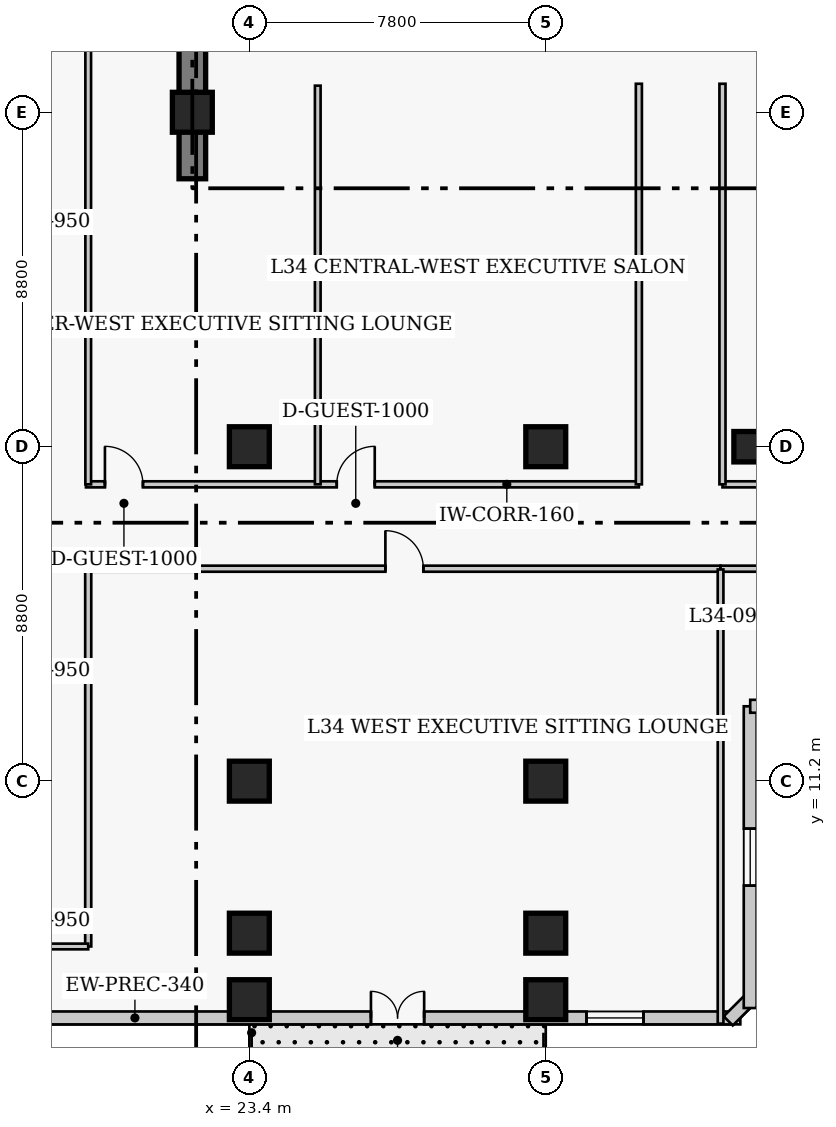
"""IFC4 building model, lengths in metres.
Left out: names, types, materials, properties, quantities, classifications, styles, units other than length and angle.
Written with IfcOpenShell. Run it as: python <this file> out.ifc"""

import sys

from ifc_helpers import new_model, si_unit, direction, frame, frame_2d, origin, origin_2d, place, context, subcontext, project, spatial, rectangle, extrude, element, fill, save


model = new_model("IFC4")
c1 = context("Model", 3, precision=1e-05, world=origin(), true_north=direction((0.0, 1.0)))
c2 = subcontext(c1, "Body", "Model", "MODEL_VIEW")
j1 = project(units=[si_unit("LENGTHUNIT", "METRE"), si_unit("PLANEANGLEUNIT", "RADIAN")], contexts=[c1])
p1 = place(None, origin())
s1 = spatial("IfcSite", under=j1, at=p1, CompositionType="ELEMENT")
p2 = place(p1, origin())
s2 = spatial("IfcBuilding", under=s1, at=p2, CompositionType="ELEMENT")
p3 = place(p2, frame((0.0, 0.0, 138.4)))
s3 = spatial("IfcBuildingStorey", under=s2, at=p3, CompositionType="ELEMENT", Elevation=138.4)
p4 = place(p3, frame((21.9, 27.05, 0.0), z_axis=(0.0, 0.0, 1.0), x_axis=(0.0, 1.0, 0.0)))
e1 = element("IfcWall", 1, at=p4, inside=s3, PredefinedType="SHEAR", context=c2, shape_type="SweptSolid", body=[
    extrude(rectangle(XDim=13.62, YDim=0.7, at=frame_2d((6.81, 0.0))), origin(), (0.0, 0.0, 1.0), 3.8),
])
for number, where, z_axis, x_axis in (
    (2, (23.4, 11.2, 0.0), (0.0, 0.0, 1.0), (1.0, 0.0, 0.0)),
    (3, (23.4, 20.0, 0.0), (0.0, 0.0, 1.0), (1.0, 0.0, 0.0)),
    (4, (31.2, 11.2, 0.0), (0.0, 0.0, 1.0), (1.0, 0.0, 0.0)),
    (5, (31.2, 20.0, 0.0), (0.0, 0.0, 1.0), (1.0, 0.0, 0.0)),
):
    element("IfcColumn", number, at=place(p3, frame(where, z_axis=z_axis, x_axis=x_axis)), inside=s3, PredefinedType="COLUMN", context=c2, shape_type="SweptSolid", body=[
        extrude(rectangle(XDim=1.05, YDim=1.05, at=origin_2d()), origin(), (0.0, 0.0, 1.0), 3.8),
    ])
p5 = place(p3, frame((36.75, 20.0, 0.0), z_axis=(0.0, 0.0, 1.0), x_axis=(1.0, 0.0, 0.0)))
e6 = element("IfcColumn", 6, at=p5, inside=s3, PredefinedType="COLUMN", context=c2, shape_type="SweptSolid", body=[
    extrude(rectangle(XDim=1.2, YDim=0.8, at=origin_2d()), origin(), (0.0, 0.0, 1.0), 3.8),
])
for number, where, z_axis, x_axis in (
    (7, (21.9, 28.8, 0.0), (0.0, 0.0, 1.0), (1.0, 0.0, 0.0)),
    (8, (23.4, 7.2, 0.0), (0.0, 0.0, 1.0), (1.0, 0.0, 0.0)),
    (9, (31.2, 7.2, 0.0), (0.0, 0.0, 1.0), (1.0, 0.0, 0.0)),
    (10, (23.4, 5.45, 0.0), (0.0, 0.0, 1.0), (1.0, 0.0, 0.0)),
    (11, (31.2, 5.45, 0.0), (0.0, 0.0, 1.0), (1.0, 0.0, 0.0)),
):
    element("IfcColumn", number, at=place(p3, frame(where, z_axis=z_axis, x_axis=x_axis)), inside=s3, PredefinedType="COLUMN", context=c2, shape_type="SweptSolid", body=[
        extrude(rectangle(XDim=1.05, YDim=1.05, at=origin_2d()), origin(), (0.0, 0.0, 1.0), 3.8),
    ])
p6 = place(p3, frame((9.63, 4.97, 0.0), z_axis=(0.0, 0.0, 1.0), x_axis=(1.0, 0.0, 0.0)))
e12 = element("IfcWall", 12, at=p6, inside=s3, PredefinedType="SOLIDWALL", context=c2, shape_type="SweptSolid", body=[
    extrude(rectangle(XDim=26.69, YDim=0.34, at=frame_2d((13.345, 0.0))), origin(), (0.0, 0.0, 1.0), 3.55),
])
p7 = place(p6, frame((16.97, 0.0, 0.0)))
e13 = element("IfcOpeningElement", 13, at=p7, cuts=e12, PredefinedType="OPENING", context=c2, shape_type="SweptSolid", body=[
    extrude(rectangle(XDim=1.4, YDim=2.15, at=frame_2d((0.7, 1.075))), frame((0.0, 0.18, 0.0), z_axis=(0.0, -1.0, 0.0), x_axis=(1.0, 0.0, 0.0)), (0.0, 0.0, 1.0), 0.36),
])
p8 = place(p6, frame((3.048, 0.0, 0.85)))
e14 = element("IfcOpeningElement", 14, at=p8, cuts=e12, PredefinedType="OPENING", context=c2, shape_type="SweptSolid", body=[
    extrude(rectangle(XDim=1.5, YDim=1.75, at=frame_2d((0.75, 0.875))), frame((0.0, 0.18, 0.0), z_axis=(0.0, -1.0, 0.0), x_axis=(1.0, 0.0, 0.0)), (0.0, 0.0, 1.0), 0.36),
])
p9 = place(p6, frame((22.642, 0.0, 0.85)))
e15 = element("IfcOpeningElement", 15, at=p9, cuts=e12, PredefinedType="OPENING", context=c2, shape_type="SweptSolid", body=[
    extrude(rectangle(XDim=1.5, YDim=1.75, at=frame_2d((0.75, 0.875))), frame((0.0, 0.18, 0.0), z_axis=(0.0, -1.0, 0.0), x_axis=(1.0, 0.0, 0.0)), (0.0, 0.0, 1.0), 0.36),
])
p10 = place(p3, frame((36.001, 4.892, 0.0), z_axis=(0.0, 0.0, 1.0), x_axis=(0.707106781187, 0.707106781187, 0.0)))
e16 = element("IfcWall", 16, at=p10, inside=s3, PredefinedType="SOLIDWALL", context=c2, shape_type="SweptSolid", body=[
    extrude(rectangle(XDim=0.929, YDim=0.34, at=frame_2d((0.464, 0.0))), origin(), (0.0, 0.0, 1.0), 3.55),
])
p11 = place(p3, frame((36.58, 5.23, 0.0), z_axis=(0.0, 0.0, 1.0), x_axis=(0.0, 1.0, 0.0)))
e17 = element("IfcWall", 17, at=p11, inside=s3, PredefinedType="SOLIDWALL", context=c2, shape_type="SweptSolid", body=[
    extrude(rectangle(XDim=7.94, YDim=0.34, at=frame_2d((3.97, 0.0))), origin(), (0.0, 0.0, 1.0), 3.55),
])
p12 = place(p11, frame((3.22, 0.0, 0.85)))
e18 = element("IfcOpeningElement", 18, at=p12, cuts=e17, PredefinedType="OPENING", context=c2, shape_type="SweptSolid", body=[
    extrude(rectangle(XDim=1.5, YDim=1.75, at=frame_2d((0.75, 0.875))), frame((0.0, 0.18, 0.0), z_axis=(0.0, -1.0, 0.0), x_axis=(1.0, 0.0, 0.0)), (0.0, 0.0, 1.0), 0.36),
])
p13 = place(p3, frame((36.58, 13.17, 0.0), z_axis=(0.0, 0.0, 1.0), x_axis=(1.0, 0.0, 0.0)))
e19 = element("IfcWall", 19, at=p13, inside=s3, PredefinedType="SOLIDWALL", context=c2, shape_type="SweptSolid", body=[
    extrude(rectangle(XDim=4.84, YDim=0.34, at=frame_2d((2.42, 0.0))), origin(), (0.0, 0.0, 1.0), 3.55),
])
p14 = place(p13, frame((1.67, 0.0, 0.85)))
e20 = element("IfcOpeningElement", 20, at=p14, cuts=e19, PredefinedType="OPENING", context=c2, shape_type="SweptSolid", body=[
    extrude(rectangle(XDim=1.5, YDim=1.75, at=frame_2d((0.75, 0.875))), frame((0.0, 0.18, 0.0), z_axis=(0.0, -1.0, 0.0), x_axis=(1.0, 0.0, 0.0)), (0.0, 0.0, 1.0), 0.36),
])
p15 = place(p3, frame((19.1, 19.01, 0.0), z_axis=(0.0, 0.0, 1.0), x_axis=(1.0, 0.0, 0.0)))
e21 = element("IfcWall", 21, at=p15, inside=s3, PredefinedType="PARTITIONING", context=c2, shape_type="SweptSolid", body=[
    extrude(rectangle(XDim=14.55, YDim=0.16, at=frame_2d((7.275, 0.0))), origin(), (0.0, 0.0, 1.0), 3.55),
])
p16 = place(p15, frame((0.5, 0.0, 0.0)))
e22 = element("IfcOpeningElement", 22, at=p16, cuts=e21, PredefinedType="OPENING", context=c2, shape_type="SweptSolid", body=[
    extrude(rectangle(XDim=1.0, YDim=2.15, at=frame_2d((0.5, 1.075))), frame((0.0, 0.09, 0.0), z_axis=(0.0, -1.0, 0.0), x_axis=(1.0, 0.0, 0.0)), (0.0, 0.0, 1.0), 0.18),
])
p17 = place(p15, frame((6.6, 0.0, 0.0)))
e23 = element("IfcOpeningElement", 23, at=p17, cuts=e21, PredefinedType="OPENING", context=c2, shape_type="SweptSolid", body=[
    extrude(rectangle(XDim=1.0, YDim=2.15, at=frame_2d((0.5, 1.075))), frame((0.0, 0.09, 0.0), z_axis=(0.0, -1.0, 0.0), x_axis=(1.0, 0.0, 0.0)), (0.0, 0.0, 1.0), 0.18),
])
p18 = place(p3, frame((35.85, 19.01, 0.0), z_axis=(0.0, 0.0, 1.0), x_axis=(1.0, 0.0, 0.0)))
e24 = element("IfcWall", 24, at=p18, inside=s3, PredefinedType="PARTITIONING", context=c2, shape_type="SweptSolid", body=[
    extrude(rectangle(XDim=23.15, YDim=0.16, at=frame_2d((11.575, 0.0))), origin(), (0.0, 0.0, 1.0), 3.55),
])
p19 = place(p18, frame((7.25, 0.0, 0.0)))
e25 = element("IfcOpeningElement", 25, at=p19, cuts=e24, PredefinedType="OPENING", context=c2, shape_type="SweptSolid", body=[
    extrude(rectangle(XDim=1.0, YDim=2.15, at=frame_2d((0.5, 1.075))), frame((0.0, 0.09, 0.0), z_axis=(0.0, -1.0, 0.0), x_axis=(1.0, 0.0, 0.0)), (0.0, 0.0, 1.0), 0.18),
])
p20 = place(p18, frame((14.85, 0.0, 0.0)))
e26 = element("IfcOpeningElement", 26, at=p20, cuts=e24, PredefinedType="OPENING", context=c2, shape_type="SweptSolid", body=[
    extrude(rectangle(XDim=1.0, YDim=2.15, at=frame_2d((0.5, 1.075))), frame((0.0, 0.09, 0.0), z_axis=(0.0, -1.0, 0.0), x_axis=(1.0, 0.0, 0.0)), (0.0, 0.0, 1.0), 0.18),
])
for number, where, z_axis, x_axis in (
    (27, (33.65, 19.01, 0.0), (0.0, 0.0, 1.0), (0.0, 1.0, 0.0)),
    (28, (35.85, 19.01, 0.0), (0.0, 0.0, 1.0), (0.0, 1.0, 0.0)),
):
    element("IfcWall", number, at=place(p3, frame(where, z_axis=z_axis, x_axis=x_axis)), inside=s3, PredefinedType="PARTITIONING", context=c2, shape_type="SweptSolid", body=[
        extrude(rectangle(XDim=10.54, YDim=0.16, at=frame_2d((5.27, 0.0))), origin(), (0.0, 0.0, 1.0), 3.55),
    ])
p21 = place(p3, frame((19.1, 16.79, 0.0), z_axis=(0.0, 0.0, 1.0), x_axis=(1.0, 0.0, 0.0)))
e29 = element("IfcWall", 29, at=p21, inside=s3, PredefinedType="PARTITIONING", context=c2, shape_type="SweptSolid", body=[
    extrude(rectangle(XDim=16.7, YDim=0.16, at=frame_2d((8.35, 0.0))), origin(), (0.0, 0.0, 1.0), 3.55),
])
p22 = place(p21, frame((7.88, 0.0, 0.0)))
e30 = element("IfcOpeningElement", 30, at=p22, cuts=e29, PredefinedType="OPENING", context=c2, shape_type="SweptSolid", body=[
    extrude(rectangle(XDim=1.0, YDim=2.15, at=frame_2d((0.5, 1.075))), frame((0.0, 0.09, 0.0), z_axis=(0.0, -1.0, 0.0), x_axis=(1.0, 0.0, 0.0)), (0.0, 0.0, 1.0), 0.18),
])
p23 = place(p3, frame((35.8, 16.79, 0.0), z_axis=(0.0, 0.0, 1.0), x_axis=(1.0, 0.0, 0.0)))
e31 = element("IfcWall", 31, at=p23, inside=s3, PredefinedType="PARTITIONING", context=c2, shape_type="SweptSolid", body=[
    extrude(rectangle(XDim=23.2, YDim=0.16, at=frame_2d((11.6, 0.0))), origin(), (0.0, 0.0, 1.0), 3.55),
])
p24 = place(p23, frame((6.202, 0.0, 0.0)))
e32 = element("IfcOpeningElement", 32, at=p24, cuts=e31, PredefinedType="OPENING", context=c2, shape_type="SweptSolid", body=[
    extrude(rectangle(XDim=0.95, YDim=2.1, at=frame_2d((0.475, 1.05))), frame((0.0, 0.09, 0.0), z_axis=(0.0, -1.0, 0.0), x_axis=(1.0, 0.0, 0.0)), (0.0, 0.0, 1.0), 0.18),
])
p25 = place(p23, frame((13.413, 0.0, 0.0)))
e33 = element("IfcOpeningElement", 33, at=p25, cuts=e31, PredefinedType="OPENING", context=c2, shape_type="SweptSolid", body=[
    extrude(rectangle(XDim=1.0, YDim=2.15, at=frame_2d((0.5, 1.075))), frame((0.0, 0.09, 0.0), z_axis=(0.0, -1.0, 0.0), x_axis=(1.0, 0.0, 0.0)), (0.0, 0.0, 1.0), 0.18),
])
p26 = place(p23, frame((18.343, 0.0, 0.0)))
e34 = element("IfcOpeningElement", 34, at=p26, cuts=e31, PredefinedType="OPENING", context=c2, shape_type="SweptSolid", body=[
    extrude(rectangle(XDim=0.95, YDim=2.1, at=frame_2d((0.475, 1.05))), frame((0.0, 0.09, 0.0), z_axis=(0.0, -1.0, 0.0), x_axis=(1.0, 0.0, 0.0)), (0.0, 0.0, 1.0), 0.18),
])
p27 = place(p3, frame((19.16, 6.85, 0.0), z_axis=(0.0, 0.0, 1.0), x_axis=(0.0, 1.0, 0.0)))
e35 = element("IfcWall", 35, at=p27, inside=s3, PredefinedType="PARTITIONING", context=c2, shape_type="SweptSolid", body=[
    extrude(rectangle(XDim=9.94, YDim=0.16, at=frame_2d((4.97, 0.0))), origin(), (0.0, 0.0, 1.0), 3.55),
])
p28 = place(p3, frame((16.94, 6.85, 0.0), z_axis=(0.0, 0.0, 1.0), x_axis=(1.0, 0.0, 0.0)))
e36 = element("IfcWall", 36, at=p28, inside=s3, PredefinedType="PARTITIONING", context=c2, shape_type="SweptSolid", body=[
    extrude(rectangle(XDim=2.22, YDim=0.15, at=frame_2d((1.11, 0.0))), origin(), (0.0, 0.0, 1.0), 3.55),
])
p29 = place(p3, frame((19.16, 19.01, 0.0), z_axis=(0.0, 0.0, 1.0), x_axis=(0.0, 1.0, 0.0)))
e37 = element("IfcWall", 37, at=p29, inside=s3, PredefinedType="PARTITIONING", context=c2, shape_type="SweptSolid", body=[
    extrude(rectangle(XDim=13.79, YDim=0.15, at=frame_2d((6.895, 0.0))), origin(), (0.0, 0.0, 1.0), 3.55),
])
p30 = place(p3, frame((25.2, 19.01, 0.0), z_axis=(0.0, 0.0, 1.0), x_axis=(0.0, 1.0, 0.0)))
e38 = element("IfcWall", 38, at=p30, inside=s3, PredefinedType="PARTITIONING", context=c2, shape_type="SweptSolid", body=[
    extrude(rectangle(XDim=10.49, YDim=0.15, at=frame_2d((5.245, 0.0))), origin(), (0.0, 0.0, 1.0), 3.55),
])
p31 = place(p3, frame((35.8, 4.82, 0.0), z_axis=(0.0, 0.0, 1.0), x_axis=(0.0, 1.0, 0.0)))
e39 = element("IfcWall", 39, at=p31, inside=s3, PredefinedType="PARTITIONING", context=c2, shape_type="SweptSolid", body=[
    extrude(rectangle(XDim=11.95, YDim=0.15, at=frame_2d((5.975, 0.0))), origin(), (0.0, 0.0, 1.0), 3.55),
])
p32 = place(p7, origin())
e40 = element("IfcDoor", 40, at=p32, inside=s3, OperationType="DOUBLE_DOOR_SINGLE_SWING", PredefinedType="DOOR", context=c2, shape_type="SweptSolid", body=[
    extrude(rectangle(XDim=1.4, YDim=2.15, at=frame_2d((0.7, 1.075))), frame((0.0, 0.025, 0.0), z_axis=(0.0, -1.0, 0.0), x_axis=(1.0, 0.0, 0.0)), (0.0, 0.0, 1.0), 0.05),
])
fill(e13, e40)
p33 = place(p9, origin())
e41 = element("IfcWindow", 41, at=p33, inside=s3, PartitioningType="SINGLE_PANEL", PredefinedType="WINDOW", context=c2, shape_type="SweptSolid", body=[
    extrude(rectangle(XDim=1.5, YDim=1.75, at=frame_2d((0.75, 0.875))), frame((0.0, 0.03, 0.0), z_axis=(0.0, -1.0, 0.0), x_axis=(1.0, 0.0, 0.0)), (0.0, 0.0, 1.0), 0.06),
])
fill(e15, e41)
p34 = place(p12, origin())
e42 = element("IfcWindow", 42, at=p34, inside=s3, PartitioningType="SINGLE_PANEL", PredefinedType="WINDOW", context=c2, shape_type="SweptSolid", body=[
    extrude(rectangle(XDim=1.5, YDim=1.75, at=frame_2d((0.75, 0.875))), frame((0.0, 0.03, 0.0), z_axis=(0.0, -1.0, 0.0), x_axis=(1.0, 0.0, 0.0)), (0.0, 0.0, 1.0), 0.06),
])
fill(e18, e42)
p35 = place(p16, origin())
e43 = element("IfcDoor", 43, at=p35, inside=s3, OperationType="SINGLE_SWING_LEFT", PredefinedType="DOOR", context=c2, shape_type="SweptSolid", body=[
    extrude(rectangle(XDim=1.0, YDim=2.15, at=frame_2d((0.5, 1.075))), frame((0.0, 0.025, 0.0), z_axis=(0.0, -1.0, 0.0), x_axis=(1.0, 0.0, 0.0)), (0.0, 0.0, 1.0), 0.05),
])
fill(e22, e43)
p36 = place(p17, origin())
e44 = element("IfcDoor", 44, at=p36, inside=s3, OperationType="SINGLE_SWING_RIGHT", PredefinedType="DOOR", context=c2, shape_type="SweptSolid", body=[
    extrude(rectangle(XDim=1.0, YDim=2.15, at=frame_2d((0.5, 1.075))), frame((0.0, 0.025, 0.0), z_axis=(0.0, -1.0, 0.0), x_axis=(1.0, 0.0, 0.0)), (0.0, 0.0, 1.0), 0.05),
])
fill(e23, e44)
p37 = place(p22, origin())
e45 = element("IfcDoor", 45, at=p37, inside=s3, OperationType="SINGLE_SWING_LEFT", PredefinedType="DOOR", context=c2, shape_type="SweptSolid", body=[
    extrude(rectangle(XDim=1.0, YDim=2.15, at=frame_2d((0.5, 1.075))), frame((0.0, 0.025, 0.0), z_axis=(0.0, -1.0, 0.0), x_axis=(1.0, 0.0, 0.0)), (0.0, 0.0, 1.0), 0.05),
])
fill(e30, e45)
save(model, sys.argv[1])
